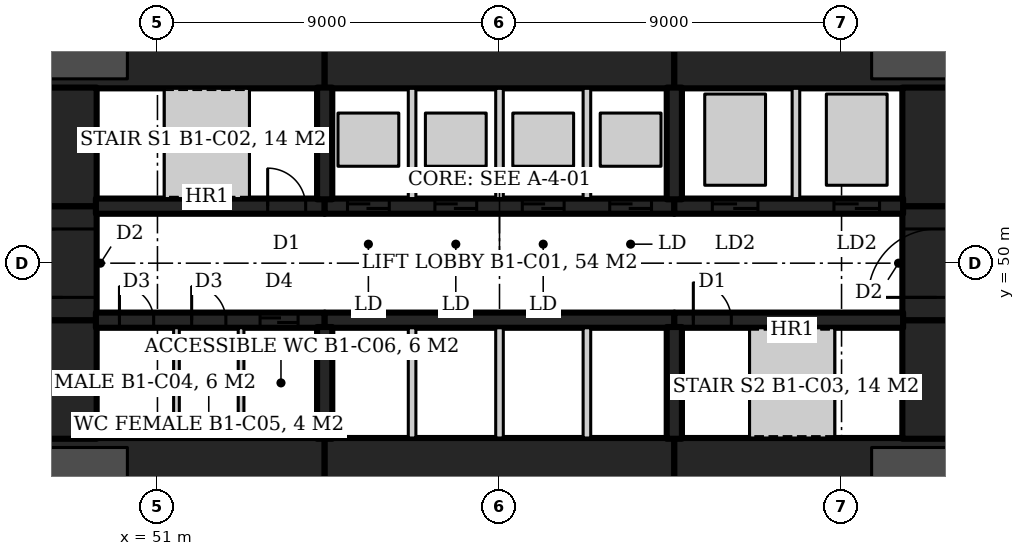
"""IFC4 building model, lengths in metres.
Left out: names, types, materials, properties, quantities, classifications, styles, units other than length and angle.
Written with IfcOpenShell. Run it as: python <this file> out.ifc"""

import sys

from ifc_helpers import new_model, si_unit, direction, frame, frame_2d, origin, origin_2d, place, context, subcontext, project, spatial, rectangle, circle, extrude, element, fill, save


model = new_model("IFC4")
c1 = context("Model", 3, precision=1e-05, world=origin(), true_north=direction((0.0, 1.0)))
c2 = subcontext(c1, "Body", "Model", "MODEL_VIEW")
j1 = project(units=[si_unit("LENGTHUNIT", "METRE"), si_unit("PLANEANGLEUNIT", "RADIAN")], contexts=[c1])
p1 = place(None, origin())
s1 = spatial("IfcSite", under=j1, at=p1, CompositionType="ELEMENT")
p2 = place(p1, origin())
s2 = spatial("IfcBuilding", under=s1, at=p2, CompositionType="ELEMENT")
p3 = place(p2, frame((0.0, 0.0, -6.0)))
s3 = spatial("IfcBuildingStorey", under=s2, at=p3, CompositionType="ELEMENT", Elevation=-6.0)
for number, where, z_axis, x_axis in (
    (1, (71.691, 56.75, 0.0), (0.0, 0.0, 1.0), (1.0, 0.0, 0.0)),
    (2, (48.309, 56.75, 0.0), (0.0, 0.0, 1.0), (1.0, 0.0, 0.0)),
    (3, (48.309, 43.25, 0.0), (0.0, 0.0, 1.0), (1.0, 0.0, 0.0)),
    (4, (71.691, 43.25, 0.0), (0.0, 0.0, 1.0), (1.0, 0.0, 0.0)),
):
    element("IfcColumn", number, at=place(p3, frame(where, z_axis=z_axis, x_axis=x_axis)), inside=s3, PredefinedType="COLUMN", context=c2, shape_type="SweptSolid", body=[
        extrude(circle(Radius=1.9, at=origin_2d()), origin(), (0.0, 0.0, 1.0), 6.0),
    ])
p4 = place(p3, frame((47.6, 55.5, 0.0), z_axis=(0.0, 0.0, 1.0), x_axis=(1.0, 0.0, 0.0)))
e5 = element("IfcWall", 5, at=p4, inside=s3, PredefinedType="SHEAR", context=c2, shape_type="SweptSolid", body=[
    extrude(rectangle(XDim=7.8, YDim=1.8, at=frame_2d((3.9, 0.0))), origin(), (0.0, 0.0, 1.0), 6.0),
])
p5 = place(p3, frame((55.4, 55.5, 0.0), z_axis=(0.0, 0.0, 1.0), x_axis=(1.0, 0.0, 0.0)))
e6 = element("IfcWall", 6, at=p5, inside=s3, PredefinedType="SHEAR", context=c2, shape_type="SweptSolid", body=[
    extrude(rectangle(XDim=9.2, YDim=1.8, at=frame_2d((4.6, 0.0))), origin(), (0.0, 0.0, 1.0), 6.0),
])
for number, where, z_axis, x_axis in (
    (7, (64.6, 55.5, 0.0), (0.0, 0.0, 1.0), (1.0, 0.0, 0.0)),
    (8, (47.6, 44.5, 0.0), (0.0, 0.0, 1.0), (1.0, 0.0, 0.0)),
):
    element("IfcWall", number, at=place(p3, frame(where, z_axis=z_axis, x_axis=x_axis)), inside=s3, PredefinedType="SHEAR", context=c2, shape_type="SweptSolid", body=[
        extrude(rectangle(XDim=7.8, YDim=1.8, at=frame_2d((3.9, 0.0))), origin(), (0.0, 0.0, 1.0), 6.0),
    ])
p6 = place(p3, frame((55.4, 44.5, 0.0), z_axis=(0.0, 0.0, 1.0), x_axis=(1.0, 0.0, 0.0)))
e9 = element("IfcWall", 9, at=p6, inside=s3, PredefinedType="SHEAR", context=c2, shape_type="SweptSolid", body=[
    extrude(rectangle(XDim=9.2, YDim=1.8, at=frame_2d((4.6, 0.0))), origin(), (0.0, 0.0, 1.0), 6.0),
])
p7 = place(p3, frame((64.6, 44.5, 0.0), z_axis=(0.0, 0.0, 1.0), x_axis=(1.0, 0.0, 0.0)))
e10 = element("IfcWall", 10, at=p7, inside=s3, PredefinedType="SHEAR", context=c2, shape_type="SweptSolid", body=[
    extrude(rectangle(XDim=7.8, YDim=1.8, at=frame_2d((3.9, 0.0))), origin(), (0.0, 0.0, 1.0), 6.0),
])
p8 = place(p3, frame((71.5, 45.38, 0.0), z_axis=(0.0, 0.0, 1.0), x_axis=(0.0, 1.0, 0.0)))
e11 = element("IfcWall", 11, at=p8, inside=s3, PredefinedType="SHEAR", context=c2, shape_type="SweptSolid", body=[
    extrude(rectangle(XDim=3.12, YDim=1.8, at=frame_2d((1.56, 0.0))), origin(), (0.0, 0.0, 1.0), 6.0),
])
p9 = place(p3, frame((71.5, 48.5, 0.0), z_axis=(0.0, 0.0, 1.0), x_axis=(0.0, 1.0, 0.0)))
e12 = element("IfcWall", 12, at=p9, inside=s3, PredefinedType="SHEAR", context=c2, shape_type="SweptSolid", body=[
    extrude(rectangle(XDim=3.0, YDim=1.8, at=frame_2d((1.5, 0.0))), origin(), (0.0, 0.0, 1.0), 6.0),
])
p10 = place(p9, frame((0.6, 0.0, 0.0)))
e13 = element("IfcOpeningElement", 13, at=p10, cuts=e12, PredefinedType="OPENING", context=c2, shape_type="SweptSolid", body=[
    extrude(rectangle(XDim=1.8, YDim=2.1, at=frame_2d((0.9, 1.05))), frame((0.0, 0.91, 0.0), z_axis=(0.0, -1.0, 0.0), x_axis=(1.0, 0.0, 0.0)), (0.0, 0.0, 1.0), 1.82),
])
for number, where, z_axis, x_axis in (
    (14, (71.5, 51.5, 0.0), (0.0, 0.0, 1.0), (0.0, 1.0, 0.0)),
    (15, (48.5, 45.38, 0.0), (0.0, 0.0, 1.0), (0.0, 1.0, 0.0)),
):
    element("IfcWall", number, at=place(p3, frame(where, z_axis=z_axis, x_axis=x_axis)), inside=s3, PredefinedType="SHEAR", context=c2, shape_type="SweptSolid", body=[
        extrude(rectangle(XDim=3.12, YDim=1.8, at=frame_2d((1.56, 0.0))), origin(), (0.0, 0.0, 1.0), 6.0),
    ])
p11 = place(p3, frame((48.5, 48.5, 0.0), z_axis=(0.0, 0.0, 1.0), x_axis=(0.0, 1.0, 0.0)))
e16 = element("IfcWall", 16, at=p11, inside=s3, PredefinedType="SHEAR", context=c2, shape_type="SweptSolid", body=[
    extrude(rectangle(XDim=3.0, YDim=1.8, at=frame_2d((1.5, 0.0))), origin(), (0.0, 0.0, 1.0), 6.0),
])
p12 = place(p11, frame((0.6, 0.0, 0.0)))
e17 = element("IfcOpeningElement", 17, at=p12, cuts=e16, PredefinedType="OPENING", context=c2, shape_type="SweptSolid", body=[
    extrude(rectangle(XDim=1.8, YDim=2.1, at=frame_2d((0.9, 1.05))), frame((0.0, 0.91, 0.0), z_axis=(0.0, -1.0, 0.0), x_axis=(1.0, 0.0, 0.0)), (0.0, 0.0, 1.0), 1.82),
])
p13 = place(p3, frame((48.5, 51.5, 0.0), z_axis=(0.0, 0.0, 1.0), x_axis=(0.0, 1.0, 0.0)))
e18 = element("IfcWall", 18, at=p13, inside=s3, PredefinedType="SHEAR", context=c2, shape_type="SweptSolid", body=[
    extrude(rectangle(XDim=3.12, YDim=1.8, at=frame_2d((1.56, 0.0))), origin(), (0.0, 0.0, 1.0), 6.0),
])
p14 = place(p3, frame((49.38, 51.5, 0.0), z_axis=(0.0, 0.0, 1.0), x_axis=(1.0, 0.0, 0.0)))
e19 = element("IfcWall", 19, at=p14, inside=s3, PredefinedType="SHEAR", context=c2, shape_type="SweptSolid", body=[
    extrude(rectangle(XDim=6.02, YDim=0.4, at=frame_2d((3.01, 0.0))), origin(), (0.0, 0.0, 1.0), 6.0),
])
p15 = place(p14, frame((4.52, 0.0, 0.0)))
e20 = element("IfcOpeningElement", 20, at=p15, cuts=e19, PredefinedType="OPENING", context=c2, shape_type="SweptSolid", body=[
    extrude(rectangle(XDim=1.0, YDim=2.1, at=frame_2d((0.5, 1.05))), frame((0.0, 0.21, 0.0), z_axis=(0.0, -1.0, 0.0), x_axis=(1.0, 0.0, 0.0)), (0.0, 0.0, 1.0), 0.42),
])
p16 = place(p3, frame((55.4, 51.5, 0.0), z_axis=(0.0, 0.0, 1.0), x_axis=(1.0, 0.0, 0.0)))
e21 = element("IfcWall", 21, at=p16, inside=s3, PredefinedType="SHEAR", context=c2, shape_type="SweptSolid", body=[
    extrude(rectangle(XDim=9.2, YDim=0.4, at=frame_2d((4.6, 0.0))), origin(), (0.0, 0.0, 1.0), 6.0),
])
p17 = place(p16, frame((0.6, 0.0, 0.0)))
e22 = element("IfcOpeningElement", 22, at=p17, cuts=e21, PredefinedType="OPENING", context=c2, shape_type="SweptSolid", body=[
    extrude(rectangle(XDim=1.1, YDim=2.1, at=frame_2d((0.55, 1.05))), frame((0.0, 0.21, 0.0), z_axis=(0.0, -1.0, 0.0), x_axis=(1.0, 0.0, 0.0)), (0.0, 0.0, 1.0), 0.42),
])
p18 = place(p16, frame((2.9, 0.0, 0.0)))
e23 = element("IfcOpeningElement", 23, at=p18, cuts=e21, PredefinedType="OPENING", context=c2, shape_type="SweptSolid", body=[
    extrude(rectangle(XDim=1.1, YDim=2.1, at=frame_2d((0.55, 1.05))), frame((0.0, 0.21, 0.0), z_axis=(0.0, -1.0, 0.0), x_axis=(1.0, 0.0, 0.0)), (0.0, 0.0, 1.0), 0.42),
])
p19 = place(p16, frame((5.2, 0.0, 0.0)))
e24 = element("IfcOpeningElement", 24, at=p19, cuts=e21, PredefinedType="OPENING", context=c2, shape_type="SweptSolid", body=[
    extrude(rectangle(XDim=1.1, YDim=2.1, at=frame_2d((0.55, 1.05))), frame((0.0, 0.21, 0.0), z_axis=(0.0, -1.0, 0.0), x_axis=(1.0, 0.0, 0.0)), (0.0, 0.0, 1.0), 0.42),
])
p20 = place(p16, frame((7.5, 0.0, 0.0)))
e25 = element("IfcOpeningElement", 25, at=p20, cuts=e21, PredefinedType="OPENING", context=c2, shape_type="SweptSolid", body=[
    extrude(rectangle(XDim=1.1, YDim=2.1, at=frame_2d((0.55, 1.05))), frame((0.0, 0.21, 0.0), z_axis=(0.0, -1.0, 0.0), x_axis=(1.0, 0.0, 0.0)), (0.0, 0.0, 1.0), 0.42),
])
p21 = place(p3, frame((64.6, 51.5, 0.0), z_axis=(0.0, 0.0, 1.0), x_axis=(1.0, 0.0, 0.0)))
e26 = element("IfcWall", 26, at=p21, inside=s3, PredefinedType="SHEAR", context=c2, shape_type="SweptSolid", body=[
    extrude(rectangle(XDim=6.02, YDim=0.4, at=frame_2d((3.01, 0.0))), origin(), (0.0, 0.0, 1.0), 6.0),
])
p22 = place(p21, frame((1.0, 0.0, 0.0)))
e27 = element("IfcOpeningElement", 27, at=p22, cuts=e26, PredefinedType="OPENING", context=c2, shape_type="SweptSolid", body=[
    extrude(rectangle(XDim=1.2, YDim=2.1, at=frame_2d((0.6, 1.05))), frame((0.0, 0.21, 0.0), z_axis=(0.0, -1.0, 0.0), x_axis=(1.0, 0.0, 0.0)), (0.0, 0.0, 1.0), 0.42),
])
p23 = place(p21, frame((4.2, 0.0, 0.0)))
e28 = element("IfcOpeningElement", 28, at=p23, cuts=e26, PredefinedType="OPENING", context=c2, shape_type="SweptSolid", body=[
    extrude(rectangle(XDim=1.2, YDim=2.1, at=frame_2d((0.6, 1.05))), frame((0.0, 0.21, 0.0), z_axis=(0.0, -1.0, 0.0), x_axis=(1.0, 0.0, 0.0)), (0.0, 0.0, 1.0), 0.42),
])
p24 = place(p3, frame((49.38, 48.5, 0.0), z_axis=(0.0, 0.0, 1.0), x_axis=(1.0, 0.0, 0.0)))
e29 = element("IfcWall", 29, at=p24, inside=s3, PredefinedType="SHEAR", context=c2, shape_type="SweptSolid", body=[
    extrude(rectangle(XDim=6.02, YDim=0.4, at=frame_2d((3.01, 0.0))), origin(), (0.0, 0.0, 1.0), 6.0),
])
p25 = place(p24, frame((0.62, 0.0, 0.0)))
e30 = element("IfcOpeningElement", 30, at=p25, cuts=e29, PredefinedType="OPENING", context=c2, shape_type="SweptSolid", body=[
    extrude(rectangle(XDim=0.9, YDim=2.1, at=frame_2d((0.45, 1.05))), frame((0.0, 0.21, 0.0), z_axis=(0.0, -1.0, 0.0), x_axis=(1.0, 0.0, 0.0)), (0.0, 0.0, 1.0), 0.42),
])
p26 = place(p24, frame((2.52, 0.0, 0.0)))
e31 = element("IfcOpeningElement", 31, at=p26, cuts=e29, PredefinedType="OPENING", context=c2, shape_type="SweptSolid", body=[
    extrude(rectangle(XDim=0.9, YDim=2.1, at=frame_2d((0.45, 1.05))), frame((0.0, 0.21, 0.0), z_axis=(0.0, -1.0, 0.0), x_axis=(1.0, 0.0, 0.0)), (0.0, 0.0, 1.0), 0.42),
])
p27 = place(p24, frame((4.32, 0.0, 0.0)))
e32 = element("IfcOpeningElement", 32, at=p27, cuts=e29, PredefinedType="OPENING", context=c2, shape_type="SweptSolid", body=[
    extrude(rectangle(XDim=1.0, YDim=2.1, at=frame_2d((0.5, 1.05))), frame((0.0, 0.21, 0.0), z_axis=(0.0, -1.0, 0.0), x_axis=(1.0, 0.0, 0.0)), (0.0, 0.0, 1.0), 0.42),
])
p28 = place(p3, frame((55.4, 48.5, 0.0), z_axis=(0.0, 0.0, 1.0), x_axis=(1.0, 0.0, 0.0)))
e33 = element("IfcWall", 33, at=p28, inside=s3, PredefinedType="SHEAR", context=c2, shape_type="SweptSolid", body=[
    extrude(rectangle(XDim=9.2, YDim=0.4, at=frame_2d((4.6, 0.0))), origin(), (0.0, 0.0, 1.0), 6.0),
])
p29 = place(p3, frame((64.6, 48.5, 0.0), z_axis=(0.0, 0.0, 1.0), x_axis=(1.0, 0.0, 0.0)))
e34 = element("IfcWall", 34, at=p29, inside=s3, PredefinedType="SHEAR", context=c2, shape_type="SweptSolid", body=[
    extrude(rectangle(XDim=6.02, YDim=0.4, at=frame_2d((3.01, 0.0))), origin(), (0.0, 0.0, 1.0), 6.0),
])
p30 = place(p29, frame((0.5, 0.0, 0.0)))
e35 = element("IfcOpeningElement", 35, at=p30, cuts=e34, PredefinedType="OPENING", context=c2, shape_type="SweptSolid", body=[
    extrude(rectangle(XDim=1.0, YDim=2.1, at=frame_2d((0.5, 1.05))), frame((0.0, 0.21, 0.0), z_axis=(0.0, -1.0, 0.0), x_axis=(1.0, 0.0, 0.0)), (0.0, 0.0, 1.0), 0.42),
])
for number, where, z_axis, x_axis in (
    (36, (55.4, 51.68, 0.0), (0.0, 0.0, 1.0), (0.0, 1.0, 0.0)),
    (37, (64.6, 51.68, 0.0), (0.0, 0.0, 1.0), (0.0, 1.0, 0.0)),
    (38, (55.4, 48.32, 0.0), (0.0, 0.0, 1.0), (0.0, -1.0, 0.0)),
    (39, (64.6, 48.32, 0.0), (0.0, 0.0, 1.0), (0.0, -1.0, 0.0)),
):
    element("IfcWall", number, at=place(p3, frame(where, z_axis=z_axis, x_axis=x_axis)), inside=s3, PredefinedType="SHEAR", context=c2, shape_type="SweptSolid", body=[
        extrude(rectangle(XDim=2.94, YDim=0.4, at=frame_2d((1.47, 0.0))), origin(), (0.0, 0.0, 1.0), 6.0),
    ])
for number, where, z_axis, x_axis in (
    (40, (57.7, 51.7, -2.5), (0.0, 0.0, 1.0), (0.0, 1.0, 0.0)),
    (41, (60.0, 51.7, -2.5), (0.0, 0.0, 1.0), (0.0, 1.0, 0.0)),
    (42, (62.3, 51.7, -2.5), (0.0, 0.0, 1.0), (0.0, 1.0, 0.0)),
):
    element("IfcWall", number, at=place(p3, frame(where, z_axis=z_axis, x_axis=x_axis)), inside=s3, PredefinedType="PARTITIONING", context=c2, shape_type="SweptSolid", body=[
        extrude(rectangle(XDim=2.9, YDim=0.2, at=frame_2d((1.45, 0.0))), origin(), (0.0, 0.0, 1.0), 8.5),
    ])
for number, where, z_axis, x_axis in (
    (43, (57.7, 45.4, 0.0), (0.0, 0.0, 1.0), (0.0, 1.0, 0.0)),
    (44, (60.0, 45.4, 0.0), (0.0, 0.0, 1.0), (0.0, 1.0, 0.0)),
    (45, (62.3, 45.4, 0.0), (0.0, 0.0, 1.0), (0.0, 1.0, 0.0)),
):
    element("IfcWall", number, at=place(p3, frame(where, z_axis=z_axis, x_axis=x_axis)), inside=s3, PredefinedType="PARTITIONING", context=c2, shape_type="SweptSolid", body=[
        extrude(rectangle(XDim=2.9, YDim=0.2, at=frame_2d((1.45, 0.0))), origin(), (0.0, 0.0, 1.0), 6.0),
    ])
p31 = place(p3, frame((67.8, 51.7, -2.5), z_axis=(0.0, 0.0, 1.0), x_axis=(0.0, 1.0, 0.0)))
e46 = element("IfcWall", 46, at=p31, inside=s3, PredefinedType="PARTITIONING", context=c2, shape_type="SweptSolid", body=[
    extrude(rectangle(XDim=2.9, YDim=0.2, at=frame_2d((1.45, 0.0))), origin(), (0.0, 0.0, 1.0), 8.5),
])
for number, where, z_axis, x_axis in (
    (47, (51.5, 45.4, 0.0), (0.0, 0.0, 1.0), (0.0, 1.0, 0.0)),
    (48, (53.2, 45.4, 0.0), (0.0, 0.0, 1.0), (0.0, 1.0, 0.0)),
):
    element("IfcWall", number, at=place(p3, frame(where, z_axis=z_axis, x_axis=x_axis)), inside=s3, PredefinedType="PARTITIONING", context=c2, shape_type="SweptSolid", body=[
        extrude(rectangle(XDim=2.9, YDim=0.15, at=frame_2d((1.45, 0.0))), origin(), (0.0, 0.0, 1.0), 5.7),
    ])
p32 = place(p15, origin())
e49 = element("IfcDoor", 49, at=p32, inside=s3, OperationType="SINGLE_SWING_LEFT", PredefinedType="DOOR", context=c2, shape_type="SweptSolid", body=[
    extrude(rectangle(XDim=1.0, YDim=2.1, at=frame_2d((0.5, 1.05))), frame((0.0, 0.025, 0.0), z_axis=(0.0, -1.0, 0.0), x_axis=(1.0, 0.0, 0.0)), (0.0, 0.0, 1.0), 0.05),
])
fill(e20, e49)
p33 = place(p30, origin())
e50 = element("IfcDoor", 50, at=p33, inside=s3, OperationType="SINGLE_SWING_LEFT", PredefinedType="DOOR", context=c2, shape_type="SweptSolid", body=[
    extrude(rectangle(XDim=1.0, YDim=2.1, at=frame_2d((0.5, 1.05))), frame((0.0, 0.025, 0.0), z_axis=(0.0, -1.0, 0.0), x_axis=(1.0, 0.0, 0.0)), (0.0, 0.0, 1.0), 0.05),
])
fill(e35, e50)
p34 = place(p22, origin())
e51 = element("IfcDoor", 51, at=p34, inside=s3, OperationType="SLIDING_TO_LEFT", PredefinedType="DOOR", context=c2, shape_type="SweptSolid", body=[
    extrude(rectangle(XDim=1.2, YDim=2.1, at=frame_2d((0.6, 1.05))), frame((0.0, 0.025, 0.0), z_axis=(0.0, -1.0, 0.0), x_axis=(1.0, 0.0, 0.0)), (0.0, 0.0, 1.0), 0.05),
])
fill(e27, e51)
p35 = place(p23, origin())
e52 = element("IfcDoor", 52, at=p35, inside=s3, OperationType="SLIDING_TO_LEFT", PredefinedType="DOOR", context=c2, shape_type="SweptSolid", body=[
    extrude(rectangle(XDim=1.2, YDim=2.1, at=frame_2d((0.6, 1.05))), frame((0.0, 0.025, 0.0), z_axis=(0.0, -1.0, 0.0), x_axis=(1.0, 0.0, 0.0)), (0.0, 0.0, 1.0), 0.05),
])
fill(e28, e52)
p36 = place(p17, origin())
e53 = element("IfcDoor", 53, at=p36, inside=s3, OperationType="SLIDING_TO_LEFT", PredefinedType="DOOR", context=c2, shape_type="SweptSolid", body=[
    extrude(rectangle(XDim=1.1, YDim=2.1, at=frame_2d((0.55, 1.05))), frame((0.0, 0.025, 0.0), z_axis=(0.0, -1.0, 0.0), x_axis=(1.0, 0.0, 0.0)), (0.0, 0.0, 1.0), 0.05),
])
fill(e22, e53)
p37 = place(p18, origin())
e54 = element("IfcDoor", 54, at=p37, inside=s3, OperationType="SLIDING_TO_LEFT", PredefinedType="DOOR", context=c2, shape_type="SweptSolid", body=[
    extrude(rectangle(XDim=1.1, YDim=2.1, at=frame_2d((0.55, 1.05))), frame((0.0, 0.025, 0.0), z_axis=(0.0, -1.0, 0.0), x_axis=(1.0, 0.0, 0.0)), (0.0, 0.0, 1.0), 0.05),
])
fill(e23, e54)
p38 = place(p19, origin())
e55 = element("IfcDoor", 55, at=p38, inside=s3, OperationType="SLIDING_TO_LEFT", PredefinedType="DOOR", context=c2, shape_type="SweptSolid", body=[
    extrude(rectangle(XDim=1.1, YDim=2.1, at=frame_2d((0.55, 1.05))), frame((0.0, 0.025, 0.0), z_axis=(0.0, -1.0, 0.0), x_axis=(1.0, 0.0, 0.0)), (0.0, 0.0, 1.0), 0.05),
])
fill(e24, e55)
p39 = place(p20, origin())
e56 = element("IfcDoor", 56, at=p39, inside=s3, OperationType="SLIDING_TO_LEFT", PredefinedType="DOOR", context=c2, shape_type="SweptSolid", body=[
    extrude(rectangle(XDim=1.1, YDim=2.1, at=frame_2d((0.55, 1.05))), frame((0.0, 0.025, 0.0), z_axis=(0.0, -1.0, 0.0), x_axis=(1.0, 0.0, 0.0)), (0.0, 0.0, 1.0), 0.05),
])
fill(e25, e56)
p40 = place(p25, origin())
e57 = element("IfcDoor", 57, at=p40, inside=s3, OperationType="SINGLE_SWING_RIGHT", PredefinedType="DOOR", context=c2, shape_type="SweptSolid", body=[
    extrude(rectangle(XDim=0.9, YDim=2.1, at=frame_2d((0.45, 1.05))), frame((0.0, 0.025, 0.0), z_axis=(0.0, -1.0, 0.0), x_axis=(1.0, 0.0, 0.0)), (0.0, 0.0, 1.0), 0.05),
])
fill(e30, e57)
p41 = place(p26, origin())
e58 = element("IfcDoor", 58, at=p41, inside=s3, OperationType="SINGLE_SWING_RIGHT", PredefinedType="DOOR", context=c2, shape_type="SweptSolid", body=[
    extrude(rectangle(XDim=0.9, YDim=2.1, at=frame_2d((0.45, 1.05))), frame((0.0, 0.025, 0.0), z_axis=(0.0, -1.0, 0.0), x_axis=(1.0, 0.0, 0.0)), (0.0, 0.0, 1.0), 0.05),
])
fill(e31, e58)
p42 = place(p27, origin())
e59 = element("IfcDoor", 59, at=p42, inside=s3, OperationType="SLIDING_TO_LEFT", PredefinedType="DOOR", context=c2, shape_type="SweptSolid", body=[
    extrude(rectangle(XDim=1.0, YDim=2.1, at=frame_2d((0.5, 1.05))), frame((0.0, 0.025, 0.0), z_axis=(0.0, -1.0, 0.0), x_axis=(1.0, 0.0, 0.0)), (0.0, 0.0, 1.0), 0.05),
])
fill(e32, e59)
p43 = place(p10, origin())
e60 = element("IfcDoor", 60, at=p43, inside=s3, OperationType="DOUBLE_DOOR_DOUBLE_SWING", PredefinedType="DOOR", context=c2, shape_type="SweptSolid", body=[
    extrude(rectangle(XDim=1.8, YDim=2.1, at=frame_2d((0.9, 1.05))), frame((0.0, 0.025, 0.0), z_axis=(0.0, -1.0, 0.0), x_axis=(1.0, 0.0, 0.0)), (0.0, 0.0, 1.0), 0.05),
])
fill(e13, e60)
p44 = place(p12, origin())
e61 = element("IfcDoor", 61, at=p44, inside=s3, OperationType="DOUBLE_DOOR_DOUBLE_SWING", PredefinedType="DOOR", context=c2, shape_type="SweptSolid", body=[
    extrude(rectangle(XDim=1.8, YDim=2.1, at=frame_2d((0.9, 1.05))), frame((0.0, 0.025, 0.0), z_axis=(0.0, -1.0, 0.0), x_axis=(1.0, 0.0, 0.0)), (0.0, 0.0, 1.0), 0.05),
])
fill(e17, e61)
save(model, sys.argv[1])
